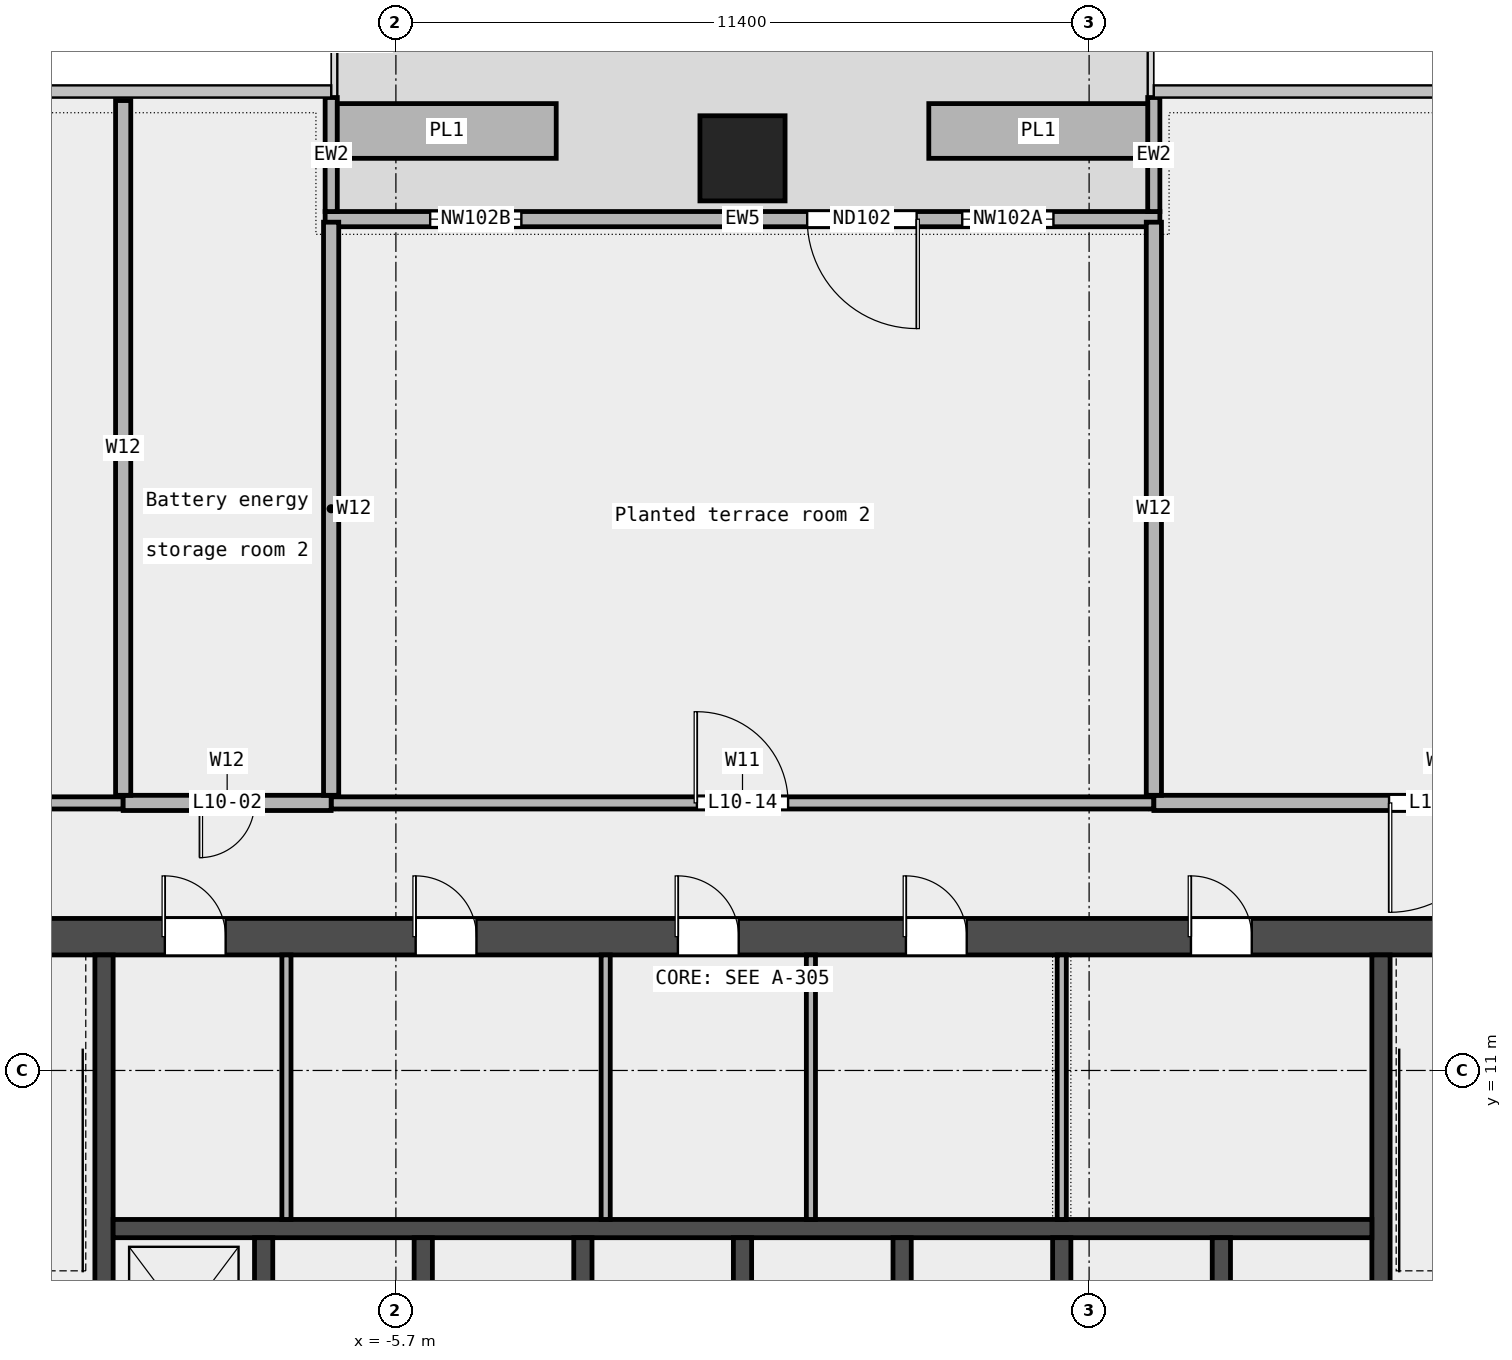
"""IFC4 building model, lengths in metres.
Left out: names, types, materials, properties, quantities, classifications, styles, units other than length and angle.
Written with IfcOpenShell. Run it as: python <this file> out.ifc"""

import sys

from ifc_helpers import new_model, si_unit, direction, frame, frame_2d, origin, origin_2d, place, context, subcontext, project, spatial, rectangle, extrude, element, fill, save


model = new_model("IFC4")
c1 = context("Model", 3, precision=1e-05, world=origin(), true_north=direction((0.0, 1.0)))
c2 = subcontext(c1, "Body", "Model", "MODEL_VIEW")
j1 = project(units=[si_unit("LENGTHUNIT", "METRE"), si_unit("PLANEANGLEUNIT", "RADIAN")], contexts=[c1])
p1 = place(None, origin())
s1 = spatial("IfcSite", under=j1, at=p1, CompositionType="ELEMENT")
p2 = place(p1, origin())
s2 = spatial("IfcBuilding", under=s1, at=p2, CompositionType="ELEMENT")
p3 = place(p2, frame((0.0, 0.0, 55.0)))
s3 = spatial("IfcBuildingStorey", under=s2, at=p3, CompositionType="ELEMENT", Elevation=55.0)
p4 = place(p3, frame((0.0, 26.0, 0.0), z_axis=(0.0, 0.0, 1.0), x_axis=(1.0, 0.0, 0.0)))
e1 = element("IfcColumn", 1, at=p4, inside=s3, PredefinedType="COLUMN", context=c2, shape_type="SweptSolid", body=[
    extrude(rectangle(XDim=1.4, YDim=1.4, at=origin_2d()), origin(), (0.0, 0.0, 1.0), 4.35),
])
p5 = place(p3, frame((6.864, 25.0, 0.0), z_axis=(0.0, 0.0, 1.0), x_axis=(-1.0, 0.0, 0.0)))
e2 = element("IfcWall", 2, at=p5, inside=s3, PredefinedType="STANDARD", context=c2, shape_type="SweptSolid", body=[
    extrude(rectangle(XDim=13.727, YDim=0.25, at=frame_2d((6.864, 0.0))), origin(), (0.0, 0.0, 1.0), 4.35),
])
p6 = place(p5, frame((1.75, 0.0, 0.45)))
e3 = element("IfcOpeningElement", 3, at=p6, cuts=e2, PredefinedType="OPENING", context=c2, shape_type="SweptSolid", body=[
    extrude(rectangle(XDim=1.5, YDim=3.0, at=frame_2d((0.75, 1.5))), frame((0.0, 0.137, 0.0), z_axis=(0.0, -1.0, 0.0), x_axis=(1.0, 0.0, 0.0)), (0.0, 0.0, 1.0), 0.274),
])
p7 = place(p5, frame((4.0, 0.0, 0.0)))
e4 = element("IfcOpeningElement", 4, at=p7, cuts=e2, PredefinedType="OPENING", context=c2, shape_type="SweptSolid", body=[
    extrude(rectangle(XDim=1.8, YDim=2.4, at=frame_2d((0.9, 1.2))), frame((0.0, 0.137, 0.0), z_axis=(0.0, -1.0, 0.0), x_axis=(1.0, 0.0, 0.0)), (0.0, 0.0, 1.0), 0.274),
])
p8 = place(p5, frame((10.5, 0.0, 0.45)))
e5 = element("IfcOpeningElement", 5, at=p8, cuts=e2, PredefinedType="OPENING", context=c2, shape_type="SweptSolid", body=[
    extrude(rectangle(XDim=1.5, YDim=3.0, at=frame_2d((0.75, 1.5))), frame((0.0, 0.137, 0.0), z_axis=(0.0, -1.0, 0.0), x_axis=(1.0, 0.0, 0.0)), (0.0, 0.0, 1.0), 0.274),
])
for number, where, z_axis, x_axis in (
    (6, (6.764, 27.0, 0.0), (0.0, 0.0, 1.0), (0.0, -1.0, 0.0)),
    (7, (-6.764, 27.0, 0.0), (0.0, 0.0, 1.0), (0.0, -1.0, 0.0)),
):
    element("IfcWall", number, at=place(p3, frame(where, z_axis=z_axis, x_axis=x_axis)), inside=s3, PredefinedType="STANDARD", context=c2, shape_type="SweptSolid", body=[
        extrude(rectangle(XDim=1.875, YDim=0.2, at=frame_2d((0.938, 0.0))), origin(), (0.0, 0.0, 1.0), 4.35),
    ])
for number, where, z_axis, x_axis in (
    (8, (6.664, 26.45, 0.0), (0.0, 0.0, 1.0), (-1.0, 0.0, 0.0)),
    (9, (-3.064, 26.45, 0.0), (0.0, 0.0, 1.0), (-1.0, 0.0, 0.0)),
):
    element("IfcWall", number, at=place(p3, frame(where, z_axis=z_axis, x_axis=x_axis)), inside=s3, PredefinedType="STANDARD", context=c2, shape_type="SweptSolid", body=[
        extrude(rectangle(XDim=3.6, YDim=0.9, at=frame_2d((1.8, 0.0))), origin(), (0.0, 0.0, 1.0), 0.7),
    ])
p9 = place(p3, frame((-16.3, 15.4, 0.0), z_axis=(0.0, 0.0, 1.0), x_axis=(1.0, 0.0, 0.0)))
e10 = element("IfcWall", 10, at=p9, inside=s3, PredefinedType="PARTITIONING", context=c2, shape_type="SweptSolid", body=[
    extrude(rectangle(XDim=6.115, YDim=0.2, at=frame_2d((3.058, 0.0))), origin(), (0.0, 0.0, 1.0), 4.35),
])
p10 = place(p9, frame((2.157, 0.0, 0.0)))
e11 = element("IfcOpeningElement", 11, at=p10, cuts=e10, PredefinedType="OPENING", context=c2, shape_type="SweptSolid", body=[
    extrude(rectangle(XDim=1.8, YDim=2.1, at=frame_2d((0.9, 1.05))), frame((0.0, 0.112, 0.0), z_axis=(0.0, -1.0, 0.0), x_axis=(1.0, 0.0, 0.0)), (0.0, 0.0, 1.0), 0.224),
])
p11 = place(p3, frame((-6.765, 15.4, 0.0), z_axis=(0.0, 0.0, 1.0), x_axis=(1.0, 0.0, 0.0)))
e12 = element("IfcWall", 12, at=p11, inside=s3, PredefinedType="PARTITIONING", context=c2, shape_type="SweptSolid", body=[
    extrude(rectangle(XDim=13.53, YDim=0.2, at=frame_2d((6.765, 0.0))), origin(), (0.0, 0.0, 1.0), 4.35),
])
p12 = place(p11, frame((6.015, 0.0, 0.0)))
e13 = element("IfcOpeningElement", 13, at=p12, cuts=e12, PredefinedType="OPENING", context=c2, shape_type="SweptSolid", body=[
    extrude(rectangle(XDim=1.5, YDim=2.1, at=frame_2d((0.75, 1.05))), frame((0.0, 0.112, 0.0), z_axis=(0.0, -1.0, 0.0), x_axis=(1.0, 0.0, 0.0)), (0.0, 0.0, 1.0), 0.224),
])
p13 = place(p3, frame((-10.185, 15.4, 0.0), z_axis=(0.0, 0.0, 1.0), x_axis=(1.0, 0.0, 0.0)))
e14 = element("IfcWall", 14, at=p13, inside=s3, PredefinedType="PARTITIONING", context=c2, shape_type="SweptSolid", body=[
    extrude(rectangle(XDim=3.42, YDim=0.25, at=frame_2d((1.71, 0.0))), origin(), (0.0, 0.0, 1.0), 4.35),
])
p14 = place(p13, frame((1.26, 0.0, 0.0)))
e15 = element("IfcOpeningElement", 15, at=p14, cuts=e14, PredefinedType="OPENING", context=c2, shape_type="SweptSolid", body=[
    extrude(rectangle(XDim=0.9, YDim=2.1, at=frame_2d((0.45, 1.05))), frame((0.0, 0.137, 0.0), z_axis=(0.0, -1.0, 0.0), x_axis=(1.0, 0.0, 0.0)), (0.0, 0.0, 1.0), 0.274),
])
p15 = place(p3, frame((6.765, 15.4, 0.0), z_axis=(0.0, 0.0, 1.0), x_axis=(1.0, 0.0, 0.0)))
e16 = element("IfcWall", 16, at=p15, inside=s3, PredefinedType="PARTITIONING", context=c2, shape_type="SweptSolid", body=[
    extrude(rectangle(XDim=9.535, YDim=0.25, at=frame_2d((4.768, 0.0))), origin(), (0.0, 0.0, 1.0), 4.35),
])
p16 = place(p15, frame((3.867, 0.0, 0.0)))
e17 = element("IfcOpeningElement", 17, at=p16, cuts=e16, PredefinedType="OPENING", context=c2, shape_type="SweptSolid", body=[
    extrude(rectangle(XDim=1.8, YDim=2.1, at=frame_2d((0.9, 1.05))), frame((0.0, 0.137, 0.0), z_axis=(0.0, -1.0, 0.0), x_axis=(1.0, 0.0, 0.0)), (0.0, 0.0, 1.0), 0.274),
])
p17 = place(p3, frame((-10.185, 15.525, 0.0), z_axis=(0.0, 0.0, 1.0), x_axis=(0.0, 1.0, 0.0)))
e18 = element("IfcWall", 18, at=p17, inside=s3, PredefinedType="PARTITIONING", context=c2, shape_type="SweptSolid", body=[
    extrude(rectangle(XDim=11.425, YDim=0.25, at=frame_2d((5.712, 0.0))), origin(), (0.0, 0.0, 1.0), 4.35),
])
for number, where, z_axis, x_axis in (
    (19, (-6.765, 15.525, 0.0), (0.0, 0.0, 1.0), (0.0, 1.0, 0.0)),
    (20, (6.765, 15.525, 0.0), (0.0, 0.0, 1.0), (0.0, 1.0, 0.0)),
):
    element("IfcWall", number, at=place(p3, frame(where, z_axis=z_axis, x_axis=x_axis)), inside=s3, PredefinedType="PARTITIONING", context=c2, shape_type="SweptSolid", body=[
        extrude(rectangle(XDim=9.425, YDim=0.25, at=frame_2d((4.712, 0.0))), origin(), (0.0, 0.0, 1.0), 4.35),
    ])
p18 = place(p3, frame((-14.4, 13.2, 0.0), z_axis=(0.0, 0.0, 1.0), x_axis=(1.0, 0.0, 0.0)))
e21 = element("IfcWall", 21, at=p18, inside=s3, PredefinedType="SHEAR", context=c2, shape_type="SweptSolid", body=[
    extrude(rectangle(XDim=28.8, YDim=0.6, at=frame_2d((14.4, 0.0))), origin(), (0.0, 0.0, 1.0), 4.5),
])
p19 = place(p18, frame((4.9, 0.0, 0.0)))
e22 = element("IfcOpeningElement", 22, at=p19, cuts=e21, PredefinedType="OPENING", context=c2, shape_type="SweptSolid", body=[
    extrude(rectangle(XDim=1.0, YDim=2.1, at=frame_2d((0.5, 1.05))), frame((0.0, 0.312, 0.0), z_axis=(0.0, -1.0, 0.0), x_axis=(1.0, 0.0, 0.0)), (0.0, 0.0, 1.0), 0.624),
])
p20 = place(p18, frame((9.025, 0.0, 0.0)))
e23 = element("IfcOpeningElement", 23, at=p20, cuts=e21, PredefinedType="OPENING", context=c2, shape_type="SweptSolid", body=[
    extrude(rectangle(XDim=1.0, YDim=2.1, at=frame_2d((0.5, 1.05))), frame((0.0, 0.312, 0.0), z_axis=(0.0, -1.0, 0.0), x_axis=(1.0, 0.0, 0.0)), (0.0, 0.0, 1.0), 0.624),
])
p21 = place(p18, frame((13.337, 0.0, 0.0)))
e24 = element("IfcOpeningElement", 24, at=p21, cuts=e21, PredefinedType="OPENING", context=c2, shape_type="SweptSolid", body=[
    extrude(rectangle(XDim=1.0, YDim=2.1, at=frame_2d((0.5, 1.05))), frame((0.0, 0.312, 0.0), z_axis=(0.0, -1.0, 0.0), x_axis=(1.0, 0.0, 0.0)), (0.0, 0.0, 1.0), 0.624),
])
p22 = place(p18, frame((17.087, 0.0, 0.0)))
e25 = element("IfcOpeningElement", 25, at=p22, cuts=e21, PredefinedType="OPENING", context=c2, shape_type="SweptSolid", body=[
    extrude(rectangle(XDim=1.0, YDim=2.1, at=frame_2d((0.5, 1.05))), frame((0.0, 0.312, 0.0), z_axis=(0.0, -1.0, 0.0), x_axis=(1.0, 0.0, 0.0)), (0.0, 0.0, 1.0), 0.624),
])
p23 = place(p18, frame((21.775, 0.0, 0.0)))
e26 = element("IfcOpeningElement", 26, at=p23, cuts=e21, PredefinedType="OPENING", context=c2, shape_type="SweptSolid", body=[
    extrude(rectangle(XDim=1.0, YDim=2.1, at=frame_2d((0.5, 1.05))), frame((0.0, 0.312, 0.0), z_axis=(0.0, -1.0, 0.0), x_axis=(1.0, 0.0, 0.0)), (0.0, 0.0, 1.0), 0.624),
])
for number, where, z_axis, x_axis in (
    (27, (-10.5, 5.25, 0.0), (0.0, 0.0, 1.0), (0.0, 1.0, 0.0)),
    (28, (10.5, 5.25, 0.0), (0.0, 0.0, 1.0), (0.0, 1.0, 0.0)),
):
    element("IfcWall", number, at=place(p3, frame(where, z_axis=z_axis, x_axis=x_axis)), inside=s3, PredefinedType="SHEAR", context=c2, shape_type="SweptSolid", body=[
        extrude(rectangle(XDim=7.65, YDim=0.3, at=frame_2d((3.825, 0.0))), origin(), (0.0, 0.0, 1.0), 4.5),
    ])
p24 = place(p3, frame((-10.35, 8.4, 0.0), z_axis=(0.0, 0.0, 1.0), x_axis=(1.0, 0.0, 0.0)))
e29 = element("IfcWall", 29, at=p24, inside=s3, PredefinedType="SOLIDWALL", context=c2, shape_type="SweptSolid", body=[
    extrude(rectangle(XDim=20.7, YDim=0.3, at=frame_2d((10.35, 0.0))), origin(), (0.0, 0.0, 1.0), 4.5),
])
for number, where, z_axis, x_axis in (
    (30, (-7.875, 5.55, 0.0), (0.0, 0.0, 1.0), (0.0, 1.0, 0.0)),
    (31, (-5.25, 5.55, 0.0), (0.0, 0.0, 1.0), (0.0, 1.0, 0.0)),
    (32, (-2.625, 5.55, 0.0), (0.0, 0.0, 1.0), (0.0, 1.0, 0.0)),
    (33, (0.0, 5.55, 0.0), (0.0, 0.0, 1.0), (0.0, 1.0, 0.0)),
    (34, (2.625, 5.55, 0.0), (0.0, 0.0, 1.0), (0.0, 1.0, 0.0)),
    (35, (5.25, 5.55, 0.0), (0.0, 0.0, 1.0), (0.0, 1.0, 0.0)),
    (36, (7.875, 5.55, 0.0), (0.0, 0.0, 1.0), (0.0, 1.0, 0.0)),
):
    element("IfcWall", number, at=place(p3, frame(where, z_axis=z_axis, x_axis=x_axis)), inside=s3, PredefinedType="SOLIDWALL", context=c2, shape_type="SweptSolid", body=[
        extrude(rectangle(XDim=2.7, YDim=0.3, at=frame_2d((1.35, 0.0))), origin(), (0.0, 0.0, 1.0), 4.5),
    ])
for number, where, z_axis, x_axis in (
    (37, (-7.5, 8.55, 0.0), (0.0, 0.0, 1.0), (0.0, 1.0, 0.0)),
    (38, (-2.25, 8.55, 0.0), (0.0, 0.0, 1.0), (0.0, 1.0, 0.0)),
    (39, (1.125, 8.55, 0.0), (0.0, 0.0, 1.0), (0.0, 1.0, 0.0)),
    (40, (5.25, 8.55, 0.0), (0.0, 0.0, 1.0), (0.0, 1.0, 0.0)),
):
    element("IfcWall", number, at=place(p3, frame(where, z_axis=z_axis, x_axis=x_axis)), inside=s3, PredefinedType="PARTITIONING", context=c2, shape_type="SweptSolid", body=[
        extrude(rectangle(XDim=4.35, YDim=0.15, at=frame_2d((2.175, 0.0))), origin(), (0.0, 0.0, 1.0), 4.5),
    ])
p25 = place(p6, origin())
e41 = element("IfcWindow", 41, at=p25, inside=s3, PartitioningType="SINGLE_PANEL", PredefinedType="WINDOW", context=c2, shape_type="SweptSolid", body=[
    extrude(rectangle(XDim=1.5, YDim=3.0, at=frame_2d((0.75, 1.5))), frame((0.0, 0.03, 0.0), z_axis=(0.0, -1.0, 0.0), x_axis=(1.0, 0.0, 0.0)), (0.0, 0.0, 1.0), 0.06),
])
fill(e3, e41)
p26 = place(p7, origin())
e42 = element("IfcDoor", 42, at=p26, inside=s3, OperationType="DOUBLE_DOOR_SINGLE_SWING", PredefinedType="DOOR", context=c2, shape_type="SweptSolid", body=[
    extrude(rectangle(XDim=1.8, YDim=2.4, at=frame_2d((0.9, 1.2))), frame((0.0, 0.025, 0.0), z_axis=(0.0, -1.0, 0.0), x_axis=(1.0, 0.0, 0.0)), (0.0, 0.0, 1.0), 0.05),
])
fill(e4, e42)
p27 = place(p8, origin())
e43 = element("IfcWindow", 43, at=p27, inside=s3, PartitioningType="SINGLE_PANEL", PredefinedType="WINDOW", context=c2, shape_type="SweptSolid", body=[
    extrude(rectangle(XDim=1.5, YDim=3.0, at=frame_2d((0.75, 1.5))), frame((0.0, 0.03, 0.0), z_axis=(0.0, -1.0, 0.0), x_axis=(1.0, 0.0, 0.0)), (0.0, 0.0, 1.0), 0.06),
])
fill(e5, e43)
p28 = place(p14, origin())
e44 = element("IfcDoor", 44, at=p28, inside=s3, OperationType="SINGLE_SWING_RIGHT", PredefinedType="DOOR", context=c2, shape_type="SweptSolid", body=[
    extrude(rectangle(XDim=0.9, YDim=2.1, at=frame_2d((0.45, 1.05))), frame((0.0, 0.025, 0.0), z_axis=(0.0, -1.0, 0.0), x_axis=(1.0, 0.0, 0.0)), (0.0, 0.0, 1.0), 0.05),
])
fill(e15, e44)
p29 = place(p16, origin())
e45 = element("IfcDoor", 45, at=p29, inside=s3, OperationType="DOUBLE_DOOR_SINGLE_SWING", PredefinedType="DOOR", context=c2, shape_type="SweptSolid", body=[
    extrude(rectangle(XDim=1.8, YDim=2.1, at=frame_2d((0.9, 1.05))), frame((0.0, 0.025, 0.0), z_axis=(0.0, -1.0, 0.0), x_axis=(1.0, 0.0, 0.0)), (0.0, 0.0, 1.0), 0.05),
])
fill(e17, e45)
p30 = place(p12, origin())
e46 = element("IfcDoor", 46, at=p30, inside=s3, OperationType="DOUBLE_DOOR_SINGLE_SWING", PredefinedType="DOOR", context=c2, shape_type="SweptSolid", body=[
    extrude(rectangle(XDim=1.5, YDim=2.1, at=frame_2d((0.75, 1.05))), frame((0.0, 0.025, 0.0), z_axis=(0.0, -1.0, 0.0), x_axis=(1.0, 0.0, 0.0)), (0.0, 0.0, 1.0), 0.05),
])
fill(e13, e46)
p31 = place(p19, origin())
e47 = element("IfcDoor", 47, at=p31, inside=s3, OperationType="SINGLE_SWING_LEFT", PredefinedType="DOOR", context=c2, shape_type="SweptSolid", body=[
    extrude(rectangle(XDim=1.0, YDim=2.1, at=frame_2d((0.5, 1.05))), frame((0.0, 0.025, 0.0), z_axis=(0.0, -1.0, 0.0), x_axis=(1.0, 0.0, 0.0)), (0.0, 0.0, 1.0), 0.05),
])
fill(e22, e47)
p32 = place(p20, origin())
e48 = element("IfcDoor", 48, at=p32, inside=s3, OperationType="SINGLE_SWING_LEFT", PredefinedType="DOOR", context=c2, shape_type="SweptSolid", body=[
    extrude(rectangle(XDim=1.0, YDim=2.1, at=frame_2d((0.5, 1.05))), frame((0.0, 0.025, 0.0), z_axis=(0.0, -1.0, 0.0), x_axis=(1.0, 0.0, 0.0)), (0.0, 0.0, 1.0), 0.05),
])
fill(e23, e48)
p33 = place(p21, origin())
e49 = element("IfcDoor", 49, at=p33, inside=s3, OperationType="SINGLE_SWING_LEFT", PredefinedType="DOOR", context=c2, shape_type="SweptSolid", body=[
    extrude(rectangle(XDim=1.0, YDim=2.1, at=frame_2d((0.5, 1.05))), frame((0.0, 0.025, 0.0), z_axis=(0.0, -1.0, 0.0), x_axis=(1.0, 0.0, 0.0)), (0.0, 0.0, 1.0), 0.05),
])
fill(e24, e49)
p34 = place(p22, origin())
e50 = element("IfcDoor", 50, at=p34, inside=s3, OperationType="SINGLE_SWING_LEFT", PredefinedType="DOOR", context=c2, shape_type="SweptSolid", body=[
    extrude(rectangle(XDim=1.0, YDim=2.1, at=frame_2d((0.5, 1.05))), frame((0.0, 0.025, 0.0), z_axis=(0.0, -1.0, 0.0), x_axis=(1.0, 0.0, 0.0)), (0.0, 0.0, 1.0), 0.05),
])
fill(e25, e50)
p35 = place(p23, origin())
e51 = element("IfcDoor", 51, at=p35, inside=s3, OperationType="SINGLE_SWING_LEFT", PredefinedType="DOOR", context=c2, shape_type="SweptSolid", body=[
    extrude(rectangle(XDim=1.0, YDim=2.1, at=frame_2d((0.5, 1.05))), frame((0.0, 0.025, 0.0), z_axis=(0.0, -1.0, 0.0), x_axis=(1.0, 0.0, 0.0)), (0.0, 0.0, 1.0), 0.05),
])
fill(e26, e51)
save(model, sys.argv[1])
